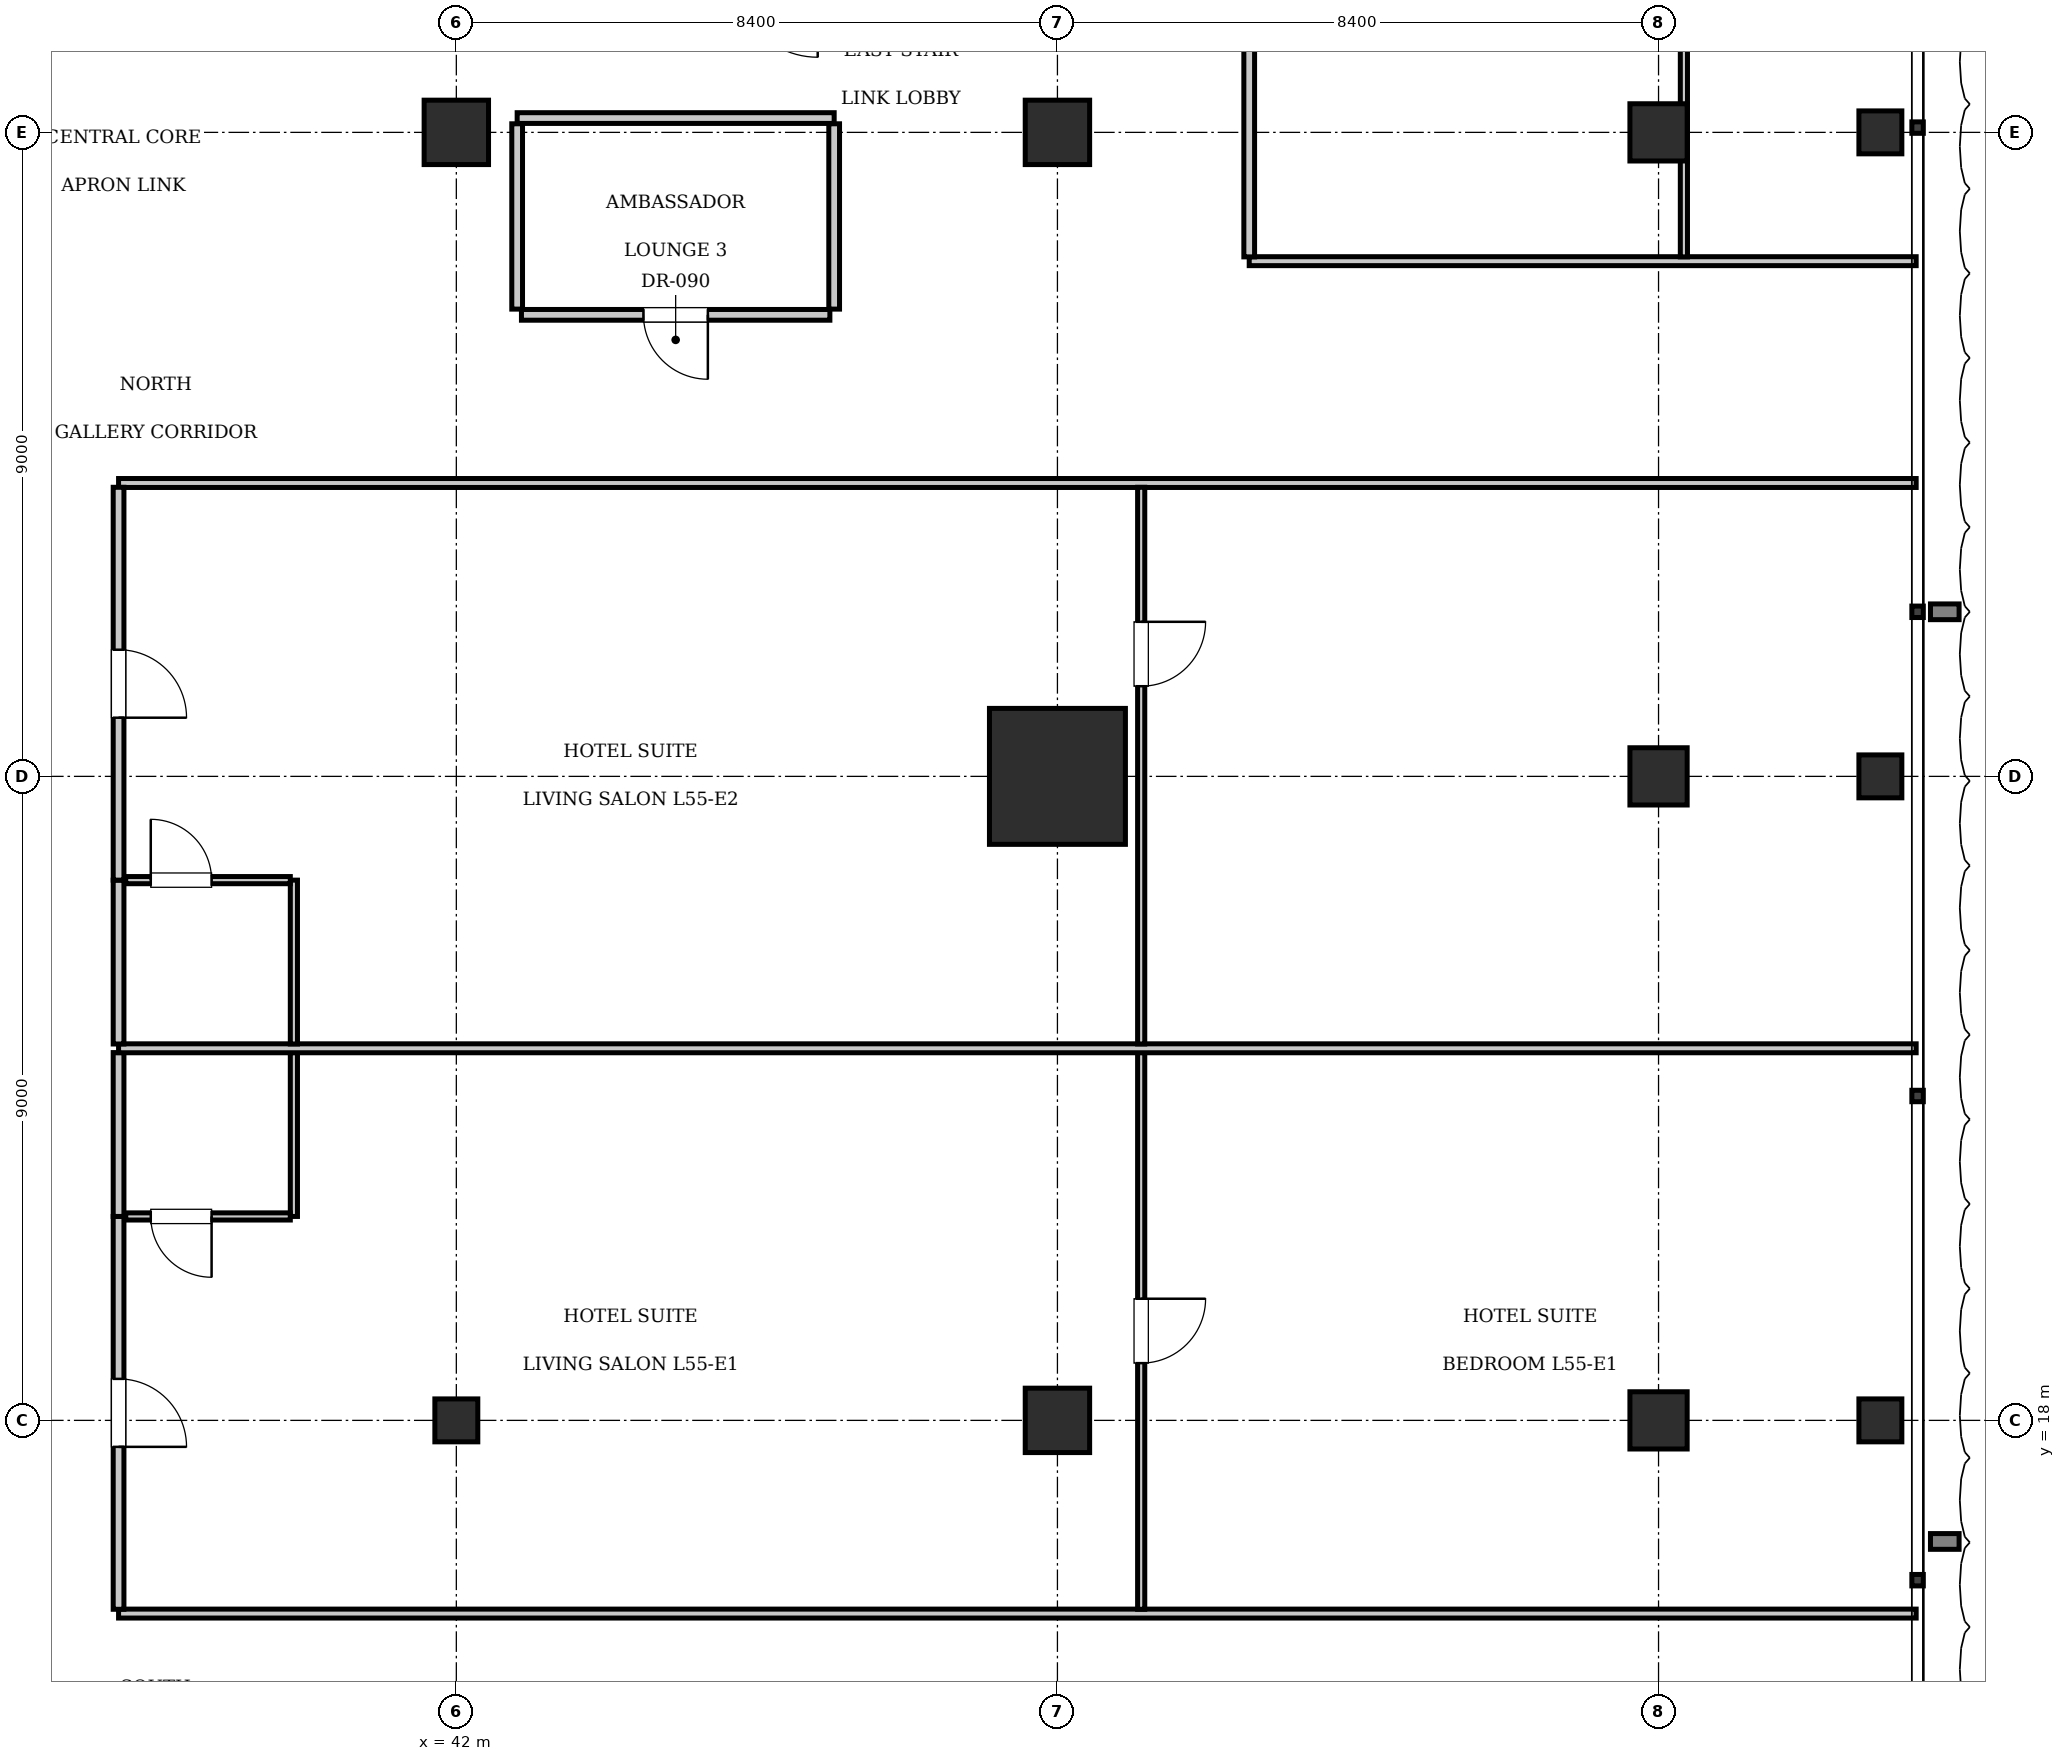
"""IFC4 building model, lengths in metres.
Left out: names, types, materials, properties, quantities, classifications, styles, units other than length and angle.
Written with IfcOpenShell. Run it as: python <this file> out.ifc"""

import sys

from ifc_helpers import new_model, si_unit, direction, frame, frame_2d, origin, origin_2d, place, context, subcontext, project, spatial, rectangle, i_section, extrude, element, fill, save


model = new_model("IFC4")
c1 = context("Model", 3, precision=1e-05, world=origin(), true_north=direction((0.0, 1.0)))
c2 = subcontext(c1, "Body", "Model", "MODEL_VIEW")
j1 = project(units=[si_unit("LENGTHUNIT", "METRE"), si_unit("PLANEANGLEUNIT", "RADIAN")], contexts=[c1])
p1 = place(None, origin())
s1 = spatial("IfcSite", under=j1, at=p1, CompositionType="ELEMENT")
p2 = place(p1, origin())
s2 = spatial("IfcBuilding", under=s1, at=p2, CompositionType="ELEMENT")
p3 = place(p2, frame((0.0, 0.0, 223.65)))
s3 = spatial("IfcBuildingStorey", under=s2, at=p3, CompositionType="ELEMENT", Elevation=223.65)
p4 = place(p3, frame((50.4, 27.0, 0.0), z_axis=(0.0, 0.0, 1.0), x_axis=(1.0, 0.0, 0.0)))
e1 = element("IfcColumn", 1, at=p4, inside=s3, PredefinedType="COLUMN", context=c2, shape_type="SweptSolid", body=[
    extrude(rectangle(XDim=1.9, YDim=1.9, at=origin_2d()), origin(), (0.0, 0.0, 1.0), 3.85),
])
for number, where, z_axis, x_axis in (
    (2, (42.0, 36.0, 0.0), (0.0, 0.0, 1.0), (1.0, 0.0, 0.0)),
    (3, (50.4, 36.0, 0.0), (0.0, 0.0, 1.0), (1.0, 0.0, 0.0)),
    (4, (50.4, 18.0, 0.0), (0.0, 0.0, 1.0), (1.0, 0.0, 0.0)),
):
    element("IfcColumn", number, at=place(p3, frame(where, z_axis=z_axis, x_axis=x_axis)), inside=s3, PredefinedType="COLUMN", context=c2, shape_type="SweptSolid", body=[
        extrude(rectangle(XDim=0.9, YDim=0.9, at=origin_2d()), origin(), (0.0, 0.0, 1.0), 3.85),
    ])
p5 = place(p3, frame((42.0, 18.0, 0.0), z_axis=(0.0, 0.0, 1.0), x_axis=(1.0, 0.0, 0.0)))
e5 = element("IfcColumn", 5, at=p5, inside=s3, PredefinedType="COLUMN", context=c2, shape_type="SweptSolid", body=[
    extrude(i_section(OverallWidth=0.6, OverallDepth=0.6, WebThickness=0.025, FlangeThickness=0.038, at=origin_2d()), origin(), (0.0, 0.0, 1.0), 3.85),
])
for number, where, z_axis, x_axis in (
    (6, (58.8, 18.0, 0.0), (0.0, 0.0, 1.0), (1.0, 0.0, 0.0)),
    (7, (58.8, 27.0, 0.0), (0.0, 0.0, 1.0), (1.0, 0.0, 0.0)),
    (8, (58.8, 36.0, 0.0), (0.0, 0.0, 1.0), (1.0, 0.0, 0.0)),
):
    element("IfcColumn", number, at=place(p3, frame(where, z_axis=z_axis, x_axis=x_axis)), inside=s3, PredefinedType="COLUMN", context=c2, shape_type="SweptSolid", body=[
        extrude(rectangle(XDim=0.8, YDim=0.8, at=origin_2d()), origin(), (0.0, 0.0, 1.0), 3.85),
    ])
for number, where, z_axis, x_axis in (
    (9, (61.9, 18.0, 0.0), (0.0, 0.0, 1.0), (1.0, 0.0, 0.0)),
    (10, (61.9, 27.0, 0.0), (0.0, 0.0, 1.0), (1.0, 0.0, 0.0)),
    (11, (61.9, 36.0, 0.0), (0.0, 0.0, 1.0), (1.0, 0.0, 0.0)),
):
    element("IfcColumn", number, at=place(p3, frame(where, z_axis=z_axis, x_axis=x_axis)), inside=s3, PredefinedType="COLUMN", context=c2, shape_type="SweptSolid", body=[
        extrude(i_section(OverallWidth=0.6, OverallDepth=0.6, WebThickness=0.025, FlangeThickness=0.038, at=origin_2d()), origin(), (0.0, 0.0, 1.0), 3.85),
    ])
p6 = place(p3, frame((42.85, 36.2, 0.0), z_axis=(0.0, 0.0, 1.0), x_axis=(1.0, 0.0, 0.0)))
e12 = element("IfcWall", 12, at=p6, inside=s3, PredefinedType="PARTITIONING", context=c2, shape_type="SweptSolid", body=[
    extrude(rectangle(XDim=4.43, YDim=0.15, at=frame_2d((2.215, 0.0))), origin(), (0.0, 0.0, 1.0), 3.55),
])
for number, where, z_axis, x_axis in (
    (13, (42.85, 33.53, 0.0), (0.0, 0.0, 1.0), (0.0, 1.0, 0.0)),
    (14, (47.28, 33.53, 0.0), (0.0, 0.0, 1.0), (0.0, 1.0, 0.0)),
):
    element("IfcWall", number, at=place(p3, frame(where, z_axis=z_axis, x_axis=x_axis)), inside=s3, PredefinedType="PARTITIONING", context=c2, shape_type="SweptSolid", body=[
        extrude(rectangle(XDim=2.59, YDim=0.15, at=frame_2d((1.295, 0.0))), origin(), (0.0, 0.0, 1.0), 3.55),
    ])
p7 = place(p3, frame((42.91, 33.45, 0.0), z_axis=(0.0, 0.0, 1.0), x_axis=(1.0, 0.0, 0.0)))
e15 = element("IfcWall", 15, at=p7, inside=s3, PredefinedType="PARTITIONING", context=c2, shape_type="SweptSolid", body=[
    extrude(rectangle(XDim=4.31, YDim=0.15, at=frame_2d((2.155, 0.0))), origin(), (0.0, 0.0, 1.0), 3.55),
])
p8 = place(p7, frame((1.705, 0.0, 0.0)))
e16 = element("IfcOpeningElement", 16, at=p8, cuts=e15, PredefinedType="OPENING", context=c2, shape_type="SweptSolid", body=[
    extrude(rectangle(XDim=0.9, YDim=2.1, at=frame_2d((0.45, 1.05))), frame((0.0, 0.085, 0.0), z_axis=(0.0, -1.0, 0.0), x_axis=(1.0, 0.0, 0.0)), (0.0, 0.0, 1.0), 0.17),
])
for number, where, z_axis, x_axis in (
    (17, (37.28, 15.3, 0.0), (0.0, 0.0, 1.0), (1.0, 0.0, 0.0)),
    (18, (37.28, 31.1, 0.0), (0.0, 0.0, 1.0), (1.0, 0.0, 0.0)),
):
    element("IfcWall", number, at=place(p3, frame(where, z_axis=z_axis, x_axis=x_axis)), inside=s3, PredefinedType="PARTITIONING", context=c2, shape_type="SweptSolid", body=[
        extrude(rectangle(XDim=25.12, YDim=0.125, at=frame_2d((12.56, 0.0))), origin(), (0.0, 0.0, 1.0), 3.55),
    ])
p9 = place(p3, frame((37.28, 15.36, 0.0), z_axis=(0.0, 0.0, 1.0), x_axis=(0.0, 1.0, 0.0)))
e19 = element("IfcWall", 19, at=p9, inside=s3, PredefinedType="PARTITIONING", context=c2, shape_type="SweptSolid", body=[
    extrude(rectangle(XDim=5.49, YDim=0.15, at=frame_2d((2.745, 0.0))), origin(), (0.0, 0.0, 1.0), 3.55),
])
p10 = place(p9, frame((2.27, 0.0, 0.0)))
e20 = element("IfcOpeningElement", 20, at=p10, cuts=e19, PredefinedType="OPENING", context=c2, shape_type="SweptSolid", body=[
    extrude(rectangle(XDim=0.95, YDim=2.15, at=frame_2d((0.475, 1.075))), frame((0.0, 0.085, 0.0), z_axis=(0.0, -1.0, 0.0), x_axis=(1.0, 0.0, 0.0)), (0.0, 0.0, 1.0), 0.17),
])
p11 = place(p3, frame((37.28, 20.85, 0.0), z_axis=(0.0, 0.0, 1.0), x_axis=(0.0, 1.0, 0.0)))
e21 = element("IfcWall", 21, at=p11, inside=s3, PredefinedType="PARTITIONING", context=c2, shape_type="SweptSolid", body=[
    extrude(rectangle(XDim=2.29, YDim=0.15, at=frame_2d((1.145, 0.0))), origin(), (0.0, 0.0, 1.0), 3.55),
])
p12 = place(p3, frame((39.73, 20.85, 0.0), z_axis=(0.0, 0.0, 1.0), x_axis=(0.0, 1.0, 0.0)))
e22 = element("IfcWall", 22, at=p12, inside=s3, PredefinedType="PARTITIONING", context=c2, shape_type="SweptSolid", body=[
    extrude(rectangle(XDim=2.29, YDim=0.1, at=frame_2d((1.145, 0.0))), origin(), (0.0, 0.0, 1.0), 3.55),
])
p13 = place(p3, frame((37.38, 20.85, 0.0), z_axis=(0.0, 0.0, 1.0), x_axis=(1.0, 0.0, 0.0)))
e23 = element("IfcWall", 23, at=p13, inside=s3, PredefinedType="PARTITIONING", context=c2, shape_type="SweptSolid", body=[
    extrude(rectangle(XDim=2.3, YDim=0.1, at=frame_2d((1.15, 0.0))), origin(), (0.0, 0.0, 1.0), 3.55),
])
p14 = place(p13, frame((0.35, 0.0, 0.0)))
e24 = element("IfcOpeningElement", 24, at=p14, cuts=e23, PredefinedType="OPENING", context=c2, shape_type="SweptSolid", body=[
    extrude(rectangle(XDim=0.85, YDim=2.1, at=frame_2d((0.425, 1.05))), frame((0.0, 0.06, 0.0), z_axis=(0.0, -1.0, 0.0), x_axis=(1.0, 0.0, 0.0)), (0.0, 0.0, 1.0), 0.12),
])
p15 = place(p3, frame((51.57, 15.36, 0.0), z_axis=(0.0, 0.0, 1.0), x_axis=(0.0, 1.0, 0.0)))
e25 = element("IfcWall", 25, at=p15, inside=s3, PredefinedType="PARTITIONING", context=c2, shape_type="SweptSolid", body=[
    extrude(rectangle(XDim=7.78, YDim=0.1, at=frame_2d((3.89, 0.0))), origin(), (0.0, 0.0, 1.0), 3.55),
])
p16 = place(p15, frame((3.44, 0.0, 0.0)))
e26 = element("IfcOpeningElement", 26, at=p16, cuts=e25, PredefinedType="OPENING", context=c2, shape_type="SweptSolid", body=[
    extrude(rectangle(XDim=0.9, YDim=2.1, at=frame_2d((0.45, 1.05))), frame((0.0, 0.06, 0.0), z_axis=(0.0, -1.0, 0.0), x_axis=(1.0, 0.0, 0.0)), (0.0, 0.0, 1.0), 0.12),
])
p17 = place(p3, frame((37.28, 23.2, 0.0), z_axis=(0.0, 0.0, 1.0), x_axis=(1.0, 0.0, 0.0)))
e27 = element("IfcWall", 27, at=p17, inside=s3, PredefinedType="PARTITIONING", context=c2, shape_type="SweptSolid", body=[
    extrude(rectangle(XDim=25.12, YDim=0.125, at=frame_2d((12.56, 0.0))), origin(), (0.0, 0.0, 1.0), 3.55),
])
p18 = place(p3, frame((37.28, 23.26, 0.0), z_axis=(0.0, 0.0, 1.0), x_axis=(0.0, 1.0, 0.0)))
e28 = element("IfcWall", 28, at=p18, inside=s3, PredefinedType="PARTITIONING", context=c2, shape_type="SweptSolid", body=[
    extrude(rectangle(XDim=2.29, YDim=0.15, at=frame_2d((1.145, 0.0))), origin(), (0.0, 0.0, 1.0), 3.55),
])
p19 = place(p3, frame((37.28, 25.55, 0.0), z_axis=(0.0, 0.0, 1.0), x_axis=(0.0, 1.0, 0.0)))
e29 = element("IfcWall", 29, at=p19, inside=s3, PredefinedType="PARTITIONING", context=c2, shape_type="SweptSolid", body=[
    extrude(rectangle(XDim=5.49, YDim=0.15, at=frame_2d((2.745, 0.0))), origin(), (0.0, 0.0, 1.0), 3.55),
])
p20 = place(p19, frame((2.27, 0.0, 0.0)))
e30 = element("IfcOpeningElement", 30, at=p20, cuts=e29, PredefinedType="OPENING", context=c2, shape_type="SweptSolid", body=[
    extrude(rectangle(XDim=0.95, YDim=2.15, at=frame_2d((0.475, 1.075))), frame((0.0, 0.085, 0.0), z_axis=(0.0, -1.0, 0.0), x_axis=(1.0, 0.0, 0.0)), (0.0, 0.0, 1.0), 0.17),
])
p21 = place(p3, frame((39.73, 23.26, 0.0), z_axis=(0.0, 0.0, 1.0), x_axis=(0.0, 1.0, 0.0)))
e31 = element("IfcWall", 31, at=p21, inside=s3, PredefinedType="PARTITIONING", context=c2, shape_type="SweptSolid", body=[
    extrude(rectangle(XDim=2.29, YDim=0.1, at=frame_2d((1.145, 0.0))), origin(), (0.0, 0.0, 1.0), 3.55),
])
p22 = place(p3, frame((37.38, 25.55, 0.0), z_axis=(0.0, 0.0, 1.0), x_axis=(1.0, 0.0, 0.0)))
e32 = element("IfcWall", 32, at=p22, inside=s3, PredefinedType="PARTITIONING", context=c2, shape_type="SweptSolid", body=[
    extrude(rectangle(XDim=2.3, YDim=0.1, at=frame_2d((1.15, 0.0))), origin(), (0.0, 0.0, 1.0), 3.55),
])
p23 = place(p22, frame((0.35, 0.0, 0.0)))
e33 = element("IfcOpeningElement", 33, at=p23, cuts=e32, PredefinedType="OPENING", context=c2, shape_type="SweptSolid", body=[
    extrude(rectangle(XDim=0.85, YDim=2.1, at=frame_2d((0.425, 1.05))), frame((0.0, 0.06, 0.0), z_axis=(0.0, -1.0, 0.0), x_axis=(1.0, 0.0, 0.0)), (0.0, 0.0, 1.0), 0.12),
])
p24 = place(p3, frame((51.57, 23.26, 0.0), z_axis=(0.0, 0.0, 1.0), x_axis=(0.0, 1.0, 0.0)))
e34 = element("IfcWall", 34, at=p24, inside=s3, PredefinedType="PARTITIONING", context=c2, shape_type="SweptSolid", body=[
    extrude(rectangle(XDim=7.78, YDim=0.1, at=frame_2d((3.89, 0.0))), origin(), (0.0, 0.0, 1.0), 3.55),
])
p25 = place(p24, frame((5.0, 0.0, 0.0)))
e35 = element("IfcOpeningElement", 35, at=p25, cuts=e34, PredefinedType="OPENING", context=c2, shape_type="SweptSolid", body=[
    extrude(rectangle(XDim=0.9, YDim=2.1, at=frame_2d((0.45, 1.05))), frame((0.0, 0.06, 0.0), z_axis=(0.0, -1.0, 0.0), x_axis=(1.0, 0.0, 0.0)), (0.0, 0.0, 1.0), 0.12),
])
p26 = place(p3, frame((53.08, 34.2, 0.0), z_axis=(0.0, 0.0, 1.0), x_axis=(1.0, 0.0, 0.0)))
e36 = element("IfcWall", 36, at=p26, inside=s3, PredefinedType="PARTITIONING", context=c2, shape_type="SweptSolid", body=[
    extrude(rectangle(XDim=9.32, YDim=0.125, at=frame_2d((4.66, 0.0))), origin(), (0.0, 0.0, 1.0), 3.55),
])
p27 = place(p3, frame((53.08, 34.26, 0.0), z_axis=(0.0, 0.0, 1.0), x_axis=(0.0, 1.0, 0.0)))
e37 = element("IfcWall", 37, at=p27, inside=s3, PredefinedType="PARTITIONING", context=c2, shape_type="SweptSolid", body=[
    extrude(rectangle(XDim=12.927, YDim=0.15, at=frame_2d((6.464, 0.0))), origin(), (0.0, 0.0, 1.0), 3.55),
])
p28 = place(p27, frame((5.989, 0.0, 0.0)))
e38 = element("IfcOpeningElement", 38, at=p28, cuts=e37, PredefinedType="OPENING", context=c2, shape_type="SweptSolid", body=[
    extrude(rectangle(XDim=0.95, YDim=2.15, at=frame_2d((0.475, 1.075))), frame((0.0, 0.085, 0.0), z_axis=(0.0, -1.0, 0.0), x_axis=(1.0, 0.0, 0.0)), (0.0, 0.0, 1.0), 0.17),
])
p29 = place(p3, frame((59.154, 34.26, 0.0), z_axis=(0.0, 0.0, 1.0), x_axis=(0.0, 1.0, 0.0)))
e39 = element("IfcWall", 39, at=p29, inside=s3, PredefinedType="PARTITIONING", context=c2, shape_type="SweptSolid", body=[
    extrude(rectangle(XDim=15.337, YDim=0.1, at=frame_2d((7.669, 0.0))), origin(), (0.0, 0.0, 1.0), 3.55),
])
p30 = place(p29, frame((7.219, 0.0, 0.0)))
e40 = element("IfcOpeningElement", 40, at=p30, cuts=e39, PredefinedType="OPENING", context=c2, shape_type="SweptSolid", body=[
    extrude(rectangle(XDim=0.9, YDim=2.1, at=frame_2d((0.45, 1.05))), frame((0.0, 0.06, 0.0), z_axis=(0.0, -1.0, 0.0), x_axis=(1.0, 0.0, 0.0)), (0.0, 0.0, 1.0), 0.12),
])
p31 = place(p8, frame((0.9, 0.0, 0.0), z_axis=(0.0, 0.0, 1.0), x_axis=(-1.0, 0.0, 0.0)))
e41 = element("IfcDoor", 41, at=p31, inside=s3, OperationType="SINGLE_SWING_LEFT", PredefinedType="DOOR", context=c2, shape_type="SweptSolid", body=[
    extrude(rectangle(XDim=0.9, YDim=2.1, at=frame_2d((0.45, 1.05))), frame((0.0, 0.025, 0.0), z_axis=(0.0, -1.0, 0.0), x_axis=(1.0, 0.0, 0.0)), (0.0, 0.0, 1.0), 0.05),
])
fill(e16, e41)
p32 = place(p14, frame((0.85, 0.0, 0.0), z_axis=(0.0, 0.0, 1.0), x_axis=(-1.0, 0.0, 0.0)))
e42 = element("IfcDoor", 42, at=p32, inside=s3, OperationType="SINGLE_SWING_LEFT", PredefinedType="DOOR", context=c2, shape_type="SweptSolid", body=[
    extrude(rectangle(XDim=0.85, YDim=2.1, at=frame_2d((0.425, 1.05))), frame((0.0, 0.025, 0.0), z_axis=(0.0, -1.0, 0.0), x_axis=(1.0, 0.0, 0.0)), (0.0, 0.0, 1.0), 0.05),
])
fill(e24, e42)
p33 = place(p10, frame((0.95, 0.0, 0.0), z_axis=(0.0, 0.0, 1.0), x_axis=(-1.0, 0.0, 0.0)))
e43 = element("IfcDoor", 43, at=p33, inside=s3, OperationType="SINGLE_SWING_RIGHT", PredefinedType="DOOR", context=c2, shape_type="SweptSolid", body=[
    extrude(rectangle(XDim=0.95, YDim=2.15, at=frame_2d((0.475, 1.075))), frame((0.0, 0.025, 0.0), z_axis=(0.0, -1.0, 0.0), x_axis=(1.0, 0.0, 0.0)), (0.0, 0.0, 1.0), 0.05),
])
fill(e20, e43)
p34 = place(p16, frame((0.9, 0.0, 0.0), z_axis=(0.0, 0.0, 1.0), x_axis=(-1.0, 0.0, 0.0)))
e44 = element("IfcDoor", 44, at=p34, inside=s3, OperationType="SINGLE_SWING_LEFT", PredefinedType="DOOR", context=c2, shape_type="SweptSolid", body=[
    extrude(rectangle(XDim=0.9, YDim=2.1, at=frame_2d((0.45, 1.05))), frame((0.0, 0.025, 0.0), z_axis=(0.0, -1.0, 0.0), x_axis=(1.0, 0.0, 0.0)), (0.0, 0.0, 1.0), 0.05),
])
fill(e26, e44)
p35 = place(p23, origin())
e45 = element("IfcDoor", 45, at=p35, inside=s3, OperationType="SINGLE_SWING_LEFT", PredefinedType="DOOR", context=c2, shape_type="SweptSolid", body=[
    extrude(rectangle(XDim=0.85, YDim=2.1, at=frame_2d((0.425, 1.05))), frame((0.0, 0.025, 0.0), z_axis=(0.0, -1.0, 0.0), x_axis=(1.0, 0.0, 0.0)), (0.0, 0.0, 1.0), 0.05),
])
fill(e33, e45)
p36 = place(p20, frame((0.95, 0.0, 0.0), z_axis=(0.0, 0.0, 1.0), x_axis=(-1.0, 0.0, 0.0)))
e46 = element("IfcDoor", 46, at=p36, inside=s3, OperationType="SINGLE_SWING_RIGHT", PredefinedType="DOOR", context=c2, shape_type="SweptSolid", body=[
    extrude(rectangle(XDim=0.95, YDim=2.15, at=frame_2d((0.475, 1.075))), frame((0.0, 0.025, 0.0), z_axis=(0.0, -1.0, 0.0), x_axis=(1.0, 0.0, 0.0)), (0.0, 0.0, 1.0), 0.05),
])
fill(e30, e46)
p37 = place(p25, frame((0.9, 0.0, 0.0), z_axis=(0.0, 0.0, 1.0), x_axis=(-1.0, 0.0, 0.0)))
e47 = element("IfcDoor", 47, at=p37, inside=s3, OperationType="SINGLE_SWING_LEFT", PredefinedType="DOOR", context=c2, shape_type="SweptSolid", body=[
    extrude(rectangle(XDim=0.9, YDim=2.1, at=frame_2d((0.45, 1.05))), frame((0.0, 0.025, 0.0), z_axis=(0.0, -1.0, 0.0), x_axis=(1.0, 0.0, 0.0)), (0.0, 0.0, 1.0), 0.05),
])
fill(e35, e47)
save(model, sys.argv[1])
